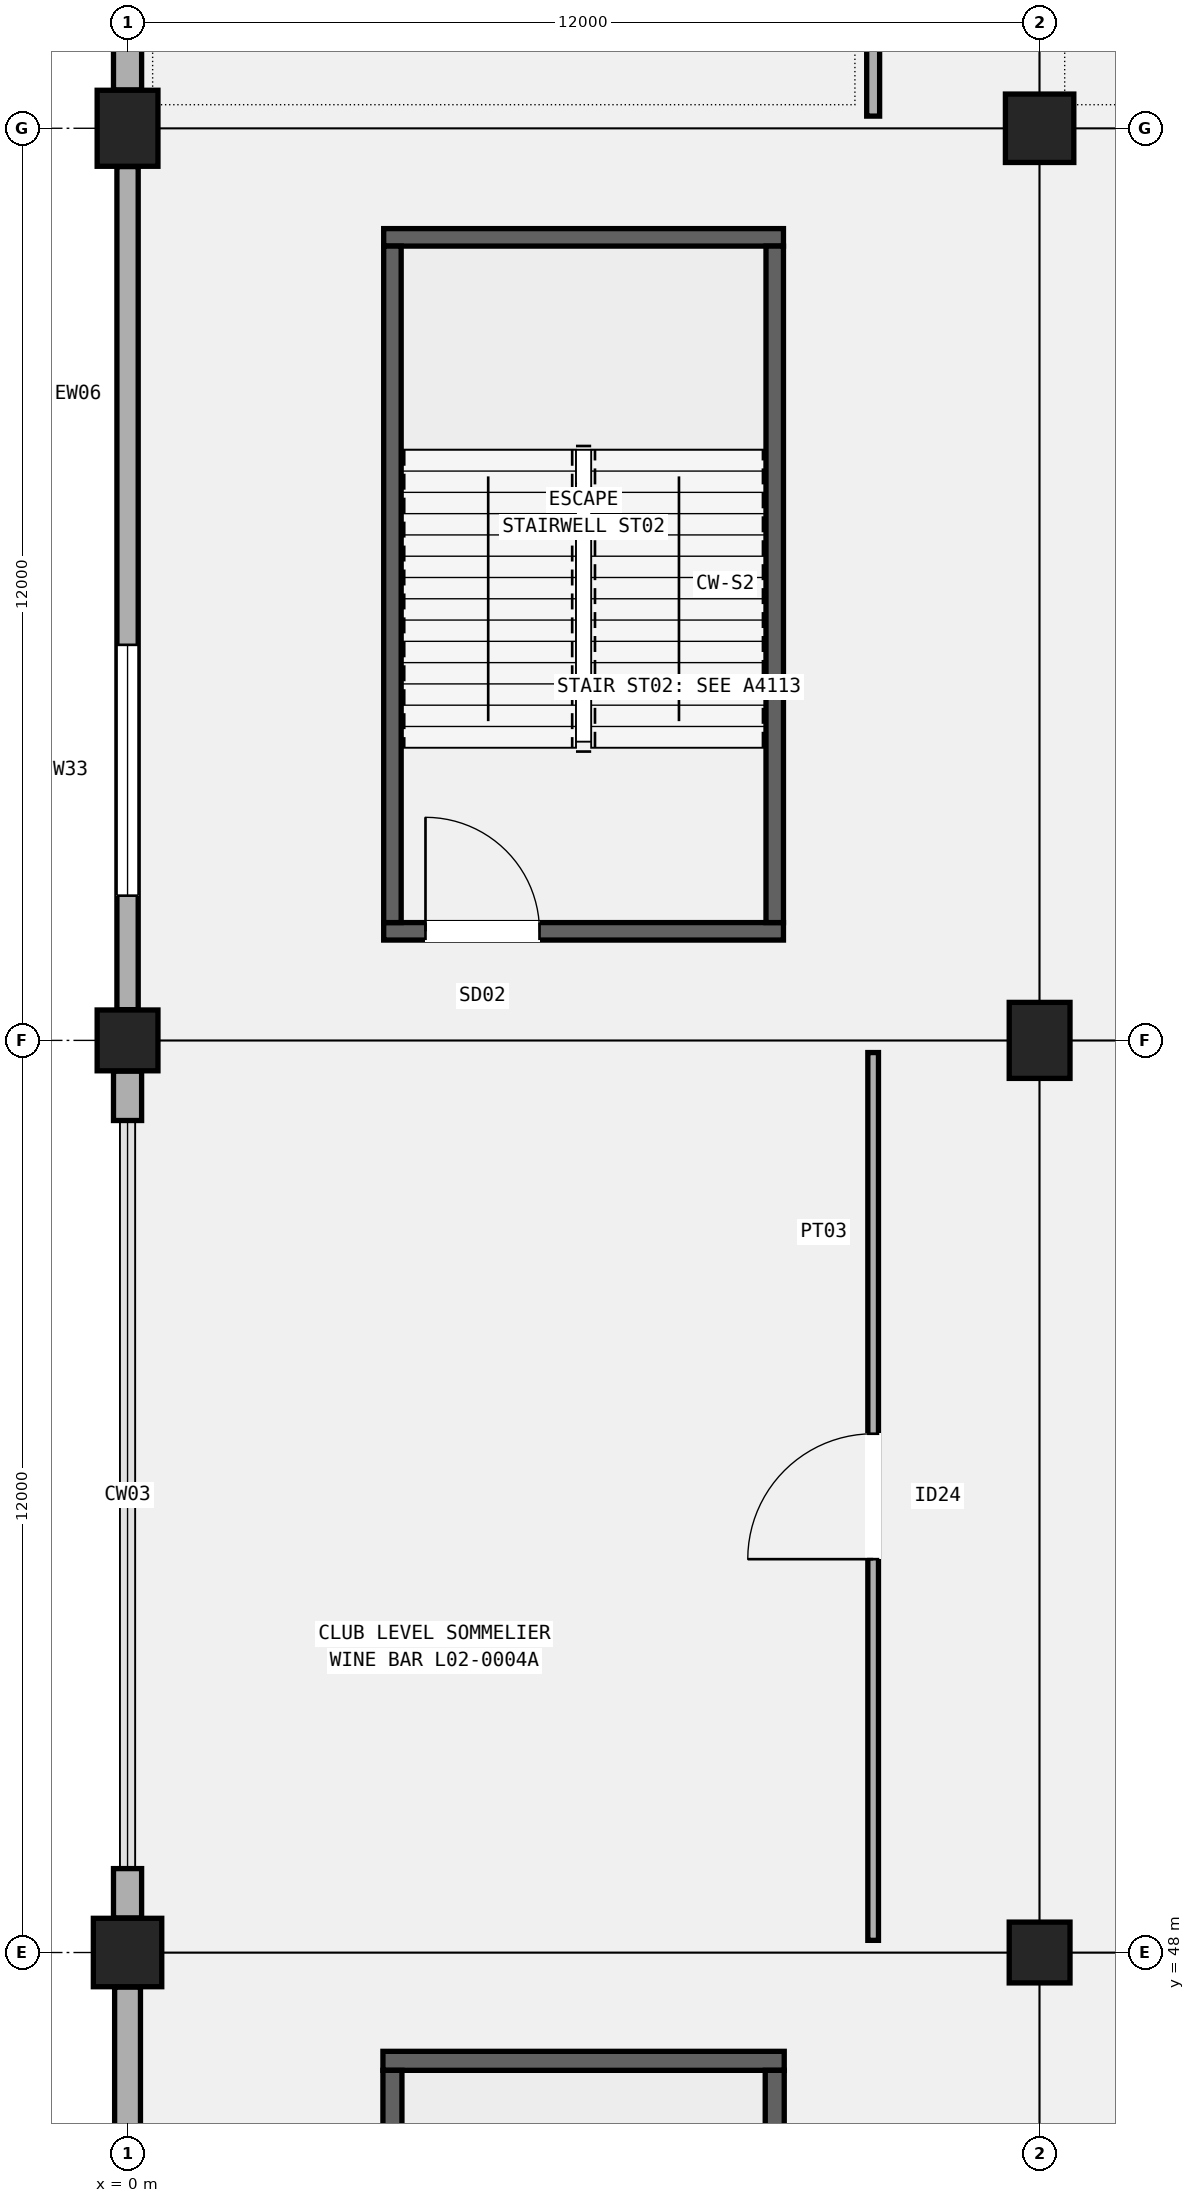
"""IFC4 building model, lengths in metres.
Left out: names, types, materials, properties, quantities, classifications, styles, units other than length and angle.
Written with IfcOpenShell. Run it as: python <this file> out.ifc"""

import sys

from ifc_helpers import new_model, si_unit, direction, frame, frame_2d, origin, origin_2d, place, context, subcontext, project, spatial, rectangle, extrude, element, fill, save


model = new_model("IFC4")
c1 = context("Model", 3, precision=1e-05, world=origin(), true_north=direction((0.0, 1.0)))
c2 = subcontext(c1, "Body", "Model", "MODEL_VIEW")
j1 = project(units=[si_unit("LENGTHUNIT", "METRE"), si_unit("PLANEANGLEUNIT", "RADIAN")], contexts=[c1])
p1 = place(None, origin())
s1 = spatial("IfcSite", under=j1, at=p1, CompositionType="ELEMENT")
p2 = place(p1, origin())
s2 = spatial("IfcBuilding", under=s1, at=p2, CompositionType="ELEMENT")
p3 = place(p2, frame((0.0, 0.0, 10.2)))
s3 = spatial("IfcBuildingStorey", under=s2, at=p3, CompositionType="ELEMENT", Elevation=10.2)
p4 = place(p3, frame((0.0, 48.0, 0.0), z_axis=(0.0, 0.0, 1.0), x_axis=(1.0, 0.0, 0.0)))
e1 = element("IfcColumn", 1, at=p4, inside=s3, PredefinedType="COLUMN", context=c2, shape_type="SweptSolid", body=[
    extrude(rectangle(XDim=0.9, YDim=0.9, at=origin_2d()), origin(), (0.0, 0.0, 1.0), 5.1),
])
p5 = place(p3, frame((0.0, 60.0, 0.0), z_axis=(0.0, 0.0, 1.0), x_axis=(1.0, 0.0, 0.0)))
e2 = element("IfcColumn", 2, at=p5, inside=s3, PredefinedType="COLUMN", context=c2, shape_type="SweptSolid", body=[
    extrude(rectangle(XDim=0.8, YDim=0.8, at=origin_2d()), origin(), (0.0, 0.0, 1.0), 5.1),
])
p6 = place(p3, frame((0.0, 72.0, 0.0), z_axis=(0.0, 0.0, 1.0), x_axis=(1.0, 0.0, 0.0)))
e3 = element("IfcColumn", 3, at=p6, inside=s3, PredefinedType="COLUMN", context=c2, shape_type="SweptSolid", body=[
    extrude(rectangle(XDim=0.8, YDim=1.0, at=origin_2d()), origin(), (0.0, 0.0, 1.0), 5.1),
])
p7 = place(p3, frame((12.0, 48.0, 0.0), z_axis=(0.0, 0.0, 1.0), x_axis=(1.0, 0.0, 0.0)))
e4 = element("IfcColumn", 4, at=p7, inside=s3, PredefinedType="COLUMN", context=c2, shape_type="SweptSolid", body=[
    extrude(rectangle(XDim=0.8, YDim=0.8, at=origin_2d()), origin(), (0.0, 0.0, 1.0), 5.1),
])
p8 = place(p3, frame((12.0, 60.0, 0.0), z_axis=(0.0, 0.0, 1.0), x_axis=(1.0, 0.0, 0.0)))
e5 = element("IfcColumn", 5, at=p8, inside=s3, PredefinedType="COLUMN", context=c2, shape_type="SweptSolid", body=[
    extrude(rectangle(XDim=0.8, YDim=1.0, at=origin_2d()), origin(), (0.0, 0.0, 1.0), 5.1),
])
p9 = place(p3, frame((12.0, 72.0, 0.0), z_axis=(0.0, 0.0, 1.0), x_axis=(1.0, 0.0, 0.0)))
e6 = element("IfcColumn", 6, at=p9, inside=s3, PredefinedType="COLUMN", context=c2, shape_type="SweptSolid", body=[
    extrude(rectangle(XDim=0.9, YDim=0.9, at=origin_2d()), origin(), (0.0, 0.0, 1.0), 5.1),
])
p10 = place(p3, frame((0.0, 36.504, 0.0), z_axis=(0.0, 0.0, 1.0), x_axis=(0.0, 1.0, 0.0)))
e7 = element("IfcWall", 7, at=p10, inside=s3, PredefinedType="SOLIDWALL", context=c2, shape_type="SweptSolid", body=[
    extrude(rectangle(XDim=11.042, YDim=0.34, at=frame_2d((5.521, 0.0))), origin(), (0.0, 0.0, 1.0), 4.02),
])
p11 = place(p10, frame((2.75, 0.0, 0.95)))
e8 = element("IfcOpeningElement", 8, at=p11, cuts=e7, PredefinedType="OPENING", context=c2, shape_type="SweptSolid", body=[
    extrude(rectangle(XDim=3.15, YDim=1.9, at=frame_2d((1.575, 0.95))), frame((0.0, 0.18, 0.0), z_axis=(0.0, -1.0, 0.0), x_axis=(1.0, 0.0, 0.0)), (0.0, 0.0, 1.0), 0.36),
])
for number, where, z_axis, x_axis in (
    (9, (0.0, 48.454, 0.0), (0.0, 0.0, 1.0), (0.0, 1.0, 0.0)),
    (10, (0.0, 58.946, 0.0), (0.0, 0.0, 1.0), (0.0, 1.0, 0.0)),
):
    element("IfcWall", number, at=place(p3, frame(where, z_axis=z_axis, x_axis=x_axis)), inside=s3, PredefinedType="SOLIDWALL", context=c2, shape_type="SweptSolid", body=[
        extrude(rectangle(XDim=0.65, YDim=0.37, at=frame_2d((0.325, 0.0))), origin(), (0.0, 0.0, 1.0), 4.12),
    ])
p12 = place(p3, frame((0.0, 60.404, 0.0), z_axis=(0.0, 0.0, 1.0), x_axis=(0.0, 1.0, 0.0)))
e11 = element("IfcWall", 11, at=p12, inside=s3, PredefinedType="SOLIDWALL", context=c2, shape_type="SweptSolid", body=[
    extrude(rectangle(XDim=11.092, YDim=0.28, at=frame_2d((5.546, 0.0))), origin(), (0.0, 0.0, 1.0), 4.232),
])
p13 = place(p12, frame((1.5, 0.0, 0.95)))
e12 = element("IfcOpeningElement", 12, at=p13, cuts=e11, PredefinedType="OPENING", context=c2, shape_type="SweptSolid", body=[
    extrude(rectangle(XDim=3.3, YDim=1.8, at=frame_2d((1.65, 0.9))), frame((0.0, 0.15, 0.0), z_axis=(0.0, -1.0, 0.0), x_axis=(1.0, 0.0, 0.0)), (0.0, 0.0, 1.0), 0.3),
])
p14 = place(p3, frame((0.0, 72.504, 0.0), z_axis=(0.0, 0.0, 1.0), x_axis=(0.0, 1.0, 0.0)))
e13 = element("IfcWall", 13, at=p14, inside=s3, PredefinedType="SOLIDWALL", context=c2, shape_type="SweptSolid", body=[
    extrude(rectangle(XDim=0.65, YDim=0.37, at=frame_2d((0.325, 0.0))), origin(), (0.0, 0.0, 1.0), 4.02),
])
p15 = place(p3, frame((3.36, 46.575, 0.0), z_axis=(0.0, 0.0, 1.0), x_axis=(1.0, 0.0, 0.0)))
e14 = element("IfcWall", 14, at=p15, inside=s3, PredefinedType="SHEAR", context=c2, shape_type="SweptSolid", body=[
    extrude(rectangle(XDim=5.28, YDim=0.25, at=frame_2d((2.64, 0.0))), origin(), (0.0, 0.0, 1.0), 4.82),
])
for number, where, z_axis, x_axis in (
    (15, (3.485, 37.55, 0.0), (0.0, 0.0, 1.0), (0.0, 1.0, 0.0)),
    (16, (8.515, 37.55, 0.0), (0.0, 0.0, 1.0), (0.0, 1.0, 0.0)),
):
    element("IfcWall", number, at=place(p3, frame(where, z_axis=z_axis, x_axis=x_axis)), inside=s3, PredefinedType="SHEAR", context=c2, shape_type="SweptSolid", body=[
        extrude(rectangle(XDim=8.9, YDim=0.25, at=frame_2d((4.45, 0.0))), origin(), (0.0, 0.0, 1.0), 4.82),
    ])
p16 = place(p3, frame((3.37, 61.435, 0.0), z_axis=(0.0, 0.0, 1.0), x_axis=(1.0, 0.0, 0.0)))
e17 = element("IfcWall", 17, at=p16, inside=s3, PredefinedType="SHEAR", context=c2, shape_type="SweptSolid", body=[
    extrude(rectangle(XDim=5.26, YDim=0.23, at=frame_2d((2.63, 0.0))), origin(), (0.0, 0.0, 1.0), 4.82),
])
p17 = place(p16, frame((0.55, 0.0, 0.0)))
e18 = element("IfcOpeningElement", 18, at=p17, cuts=e17, PredefinedType="OPENING", context=c2, shape_type="SweptSolid", body=[
    extrude(rectangle(XDim=1.5, YDim=2.2, at=frame_2d((0.75, 1.1))), frame((0.0, 0.125, 0.0), z_axis=(0.0, -1.0, 0.0), x_axis=(1.0, 0.0, 0.0)), (0.0, 0.0, 1.0), 0.25),
])
p18 = place(p3, frame((3.37, 70.565, 0.0), z_axis=(0.0, 0.0, 1.0), x_axis=(1.0, 0.0, 0.0)))
e19 = element("IfcWall", 19, at=p18, inside=s3, PredefinedType="SHEAR", context=c2, shape_type="SweptSolid", body=[
    extrude(rectangle(XDim=5.26, YDim=0.23, at=frame_2d((2.63, 0.0))), origin(), (0.0, 0.0, 1.0), 4.82),
])
for number, where, z_axis, x_axis in (
    (20, (3.485, 61.55, 0.0), (0.0, 0.0, 1.0), (0.0, 1.0, 0.0)),
    (21, (8.515, 61.55, 0.0), (0.0, 0.0, 1.0), (0.0, 1.0, 0.0)),
):
    element("IfcWall", number, at=place(p3, frame(where, z_axis=z_axis, x_axis=x_axis)), inside=s3, PredefinedType="SHEAR", context=c2, shape_type="SweptSolid", body=[
        extrude(rectangle(XDim=8.9, YDim=0.23, at=frame_2d((4.45, 0.0))), origin(), (0.0, 0.0, 1.0), 4.82),
    ])
p19 = place(p3, frame((9.81, 48.16, 0.0), z_axis=(0.0, 0.0, 1.0), x_axis=(0.0, 1.0, 0.0)))
e22 = element("IfcWall", 22, at=p19, inside=s3, PredefinedType="PARTITIONING", context=c2, shape_type="SweptSolid", body=[
    extrude(rectangle(XDim=11.68, YDim=0.14, at=frame_2d((5.84, 0.0))), origin(), (0.0, 0.0, 1.0), 4.22),
])
p20 = place(p19, frame((5.015, 0.0, 0.0)))
e23 = element("IfcOpeningElement", 23, at=p20, cuts=e22, PredefinedType="OPENING", context=c2, shape_type="SweptSolid", body=[
    extrude(rectangle(XDim=1.65, YDim=2.28, at=frame_2d((0.825, 1.14))), frame((0.0, 0.08, 0.0), z_axis=(0.0, -1.0, 0.0), x_axis=(1.0, 0.0, 0.0)), (0.0, 0.0, 1.0), 0.16),
])
p21 = place(p3, frame((9.81, 72.16, 0.0), z_axis=(0.0, 0.0, 1.0), x_axis=(0.0, 1.0, 0.0)))
e24 = element("IfcWall", 24, at=p21, inside=s3, PredefinedType="PARTITIONING", context=c2, shape_type="SweptSolid", body=[
    extrude(rectangle(XDim=11.68, YDim=0.17, at=frame_2d((5.84, 0.0))), origin(), (0.0, 0.0, 1.0), 4.22),
])
p22 = place(p21, frame((4.99, 0.0, 0.0)))
e25 = element("IfcOpeningElement", 25, at=p22, cuts=e24, PredefinedType="OPENING", context=c2, shape_type="SweptSolid", body=[
    extrude(rectangle(XDim=1.7, YDim=2.32, at=frame_2d((0.85, 1.16))), frame((0.0, 0.095, 0.0), z_axis=(0.0, -1.0, 0.0), x_axis=(1.0, 0.0, 0.0)), (0.0, 0.0, 1.0), 0.19),
])
p23 = place(p13, origin())
e26 = element("IfcWindow", 26, at=p23, inside=s3, PartitioningType="SINGLE_PANEL", PredefinedType="WINDOW", context=c2, shape_type="SweptSolid", body=[
    extrude(rectangle(XDim=3.3, YDim=1.8, at=frame_2d((1.65, 0.9))), frame((0.0, 0.03, 0.0), z_axis=(0.0, -1.0, 0.0), x_axis=(1.0, 0.0, 0.0)), (0.0, 0.0, 1.0), 0.06),
])
fill(e12, e26)
p24 = place(p17, origin())
e27 = element("IfcDoor", 27, at=p24, inside=s3, OperationType="SINGLE_SWING_LEFT", PredefinedType="DOOR", context=c2, shape_type="SweptSolid", body=[
    extrude(rectangle(XDim=1.5, YDim=2.2, at=frame_2d((0.75, 1.1))), frame((0.0, 0.025, 0.0), z_axis=(0.0, -1.0, 0.0), x_axis=(1.0, 0.0, 0.0)), (0.0, 0.0, 1.0), 0.05),
])
fill(e18, e27)
p25 = place(p20, origin())
e28 = element("IfcDoor", 28, at=p25, inside=s3, OperationType="SINGLE_SWING_LEFT", PredefinedType="DOOR", context=c2, shape_type="SweptSolid", body=[
    extrude(rectangle(XDim=1.65, YDim=2.28, at=frame_2d((0.825, 1.14))), frame((0.0, 0.025, 0.0), z_axis=(0.0, -1.0, 0.0), x_axis=(1.0, 0.0, 0.0)), (0.0, 0.0, 1.0), 0.05),
])
fill(e23, e28)
save(model, sys.argv[1])
